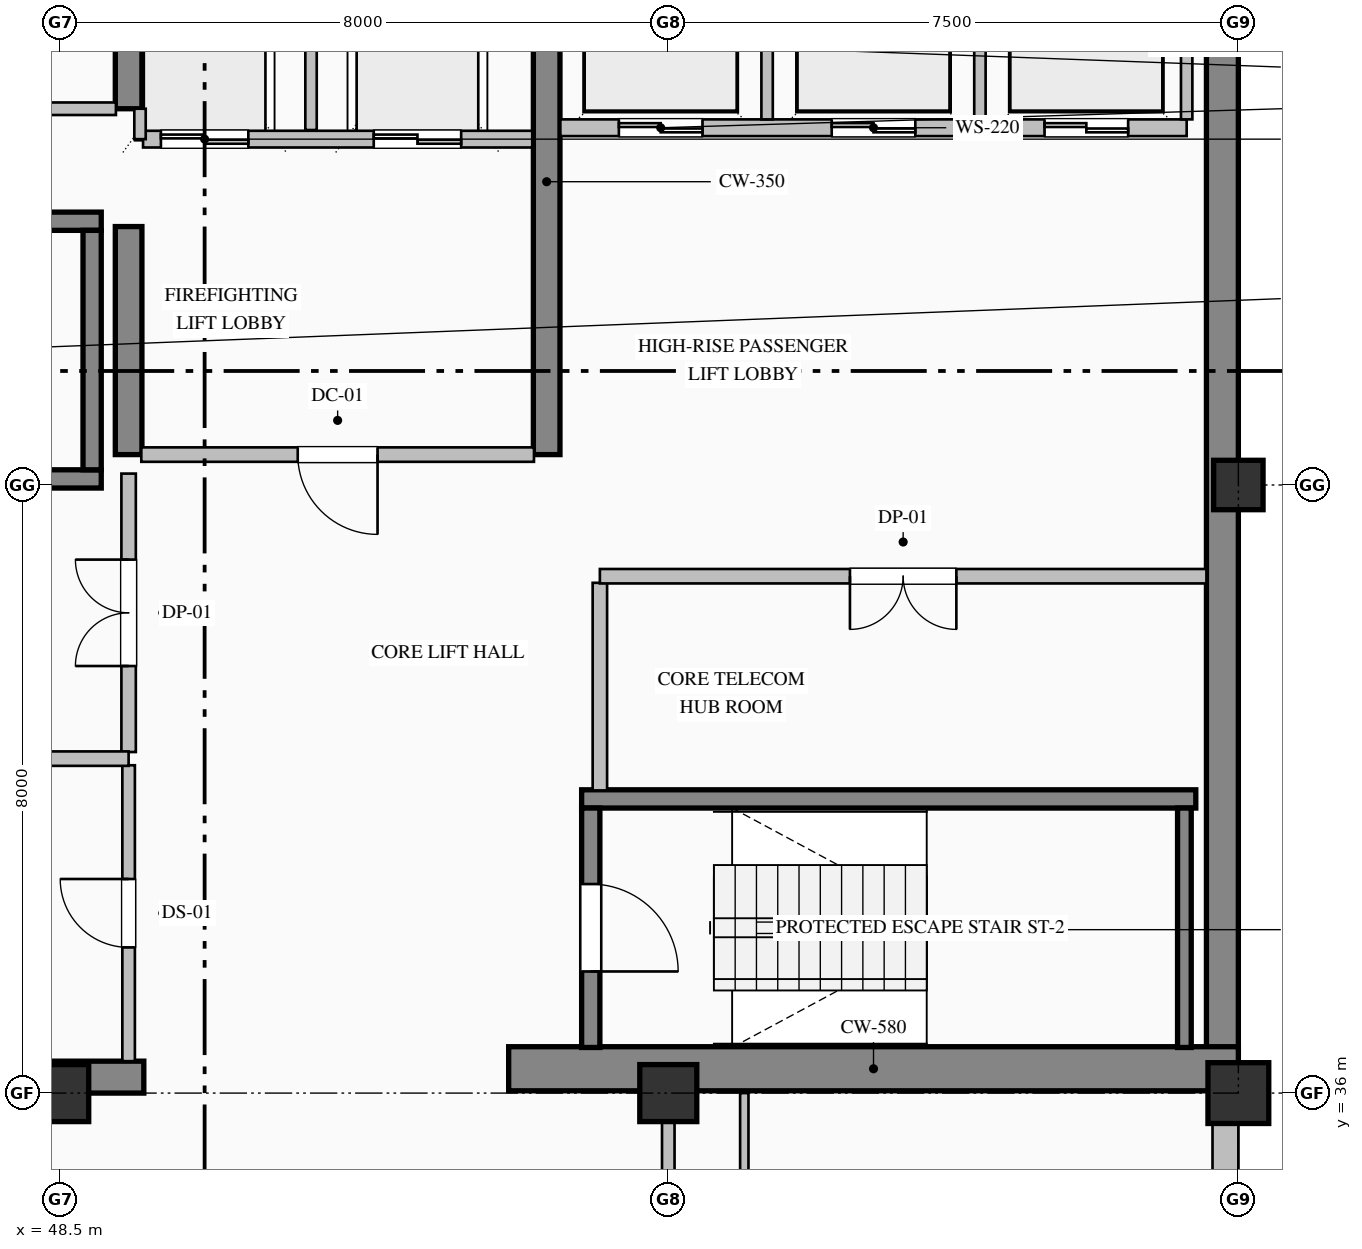
"""IFC4 building model, lengths in metres.
Left out: names, types, materials, properties, quantities, classifications, styles, units other than length and angle.
Written with IfcOpenShell. Run it as: python <this file> out.ifc"""

import sys

from ifc_helpers import new_model, si_unit, direction, frame, frame_2d, origin, origin_2d, place, context, subcontext, project, spatial, rectangle, hollow_rectangle, extrude, element, fill, save


model = new_model("IFC4")
c1 = context("Model", 3, precision=1e-05, world=origin(), true_north=direction((0.0, 1.0)))
c2 = subcontext(c1, "Body", "Model", "MODEL_VIEW")
j1 = project(units=[si_unit("LENGTHUNIT", "METRE"), si_unit("PLANEANGLEUNIT", "RADIAN")], contexts=[c1])
p1 = place(None, origin())
s1 = spatial("IfcSite", under=j1, at=p1, CompositionType="ELEMENT")
p2 = place(p1, origin())
s2 = spatial("IfcBuilding", under=s1, at=p2, CompositionType="ELEMENT")
p3 = place(p2, frame((0.0, 0.0, 335.2)))
s3 = spatial("IfcBuildingStorey", under=s2, at=p3, CompositionType="ELEMENT", Elevation=335.2)
p4 = place(p3, frame((63.79, 36.32, 0.0), z_axis=(0.0, 0.0, 1.0), x_axis=(0.0, 1.0, 0.0)))
e1 = element("IfcWall", 1, at=p4, inside=s3, PredefinedType="SHEAR", context=c2, shape_type="SweptSolid", body=[
    extrude(rectangle(XDim=15.26, YDim=0.42, at=frame_2d((7.63, 0.0))), origin(), (0.0, 0.0, 1.0), 3.785),
])
p5 = place(p3, frame((40.5, 36.21, 0.0), z_axis=(0.0, 0.0, 1.0), x_axis=(1.0, 0.0, 0.0)))
e2 = element("IfcWall", 2, at=p5, inside=s3, PredefinedType="SHEAR", context=c2, shape_type="SweptSolid", body=[
    extrude(rectangle(XDim=9.1, YDim=0.42, at=frame_2d((4.55, 0.0))), origin(), (0.0, 0.0, 1.0), 3.785),
])
p6 = place(p3, frame((54.4, 36.32, 0.0), z_axis=(0.0, 0.0, 1.0), x_axis=(1.0, 0.0, 0.0)))
e3 = element("IfcWall", 3, at=p6, inside=s3, PredefinedType="SHEAR", context=c2, shape_type="SweptSolid", body=[
    extrude(rectangle(XDim=9.6, YDim=0.58, at=frame_2d((4.8, 0.0))), origin(), (0.0, 0.0, 1.0), 4.0),
])
p7 = place(p3, frame((49.4, 44.4, 0.0), z_axis=(0.0, 0.0, 1.0), x_axis=(0.0, 1.0, 0.0)))
e4 = element("IfcWall", 4, at=p7, inside=s3, PredefinedType="SHEAR", context=c2, shape_type="SweptSolid", body=[
    extrude(rectangle(XDim=3.0, YDim=0.35, at=frame_2d((1.5, 0.0))), origin(), (0.0, 0.0, 1.0), 3.785),
])
p8 = place(p3, frame((49.4, 48.95, 0.0), z_axis=(0.0, 0.0, 1.0), x_axis=(0.0, 1.0, 0.0)))
e5 = element("IfcWall", 5, at=p8, inside=s3, PredefinedType="SHEAR", context=c2, shape_type="SweptSolid", body=[
    extrude(rectangle(XDim=2.63, YDim=0.35, at=frame_2d((1.315, 0.0))), origin(), (0.0, 0.0, 1.0), 3.785),
])
p9 = place(p3, frame((54.9, 44.4, 0.0), z_axis=(0.0, 0.0, 1.0), x_axis=(0.0, 1.0, 0.0)))
e6 = element("IfcWall", 6, at=p9, inside=s3, PredefinedType="SHEAR", context=c2, shape_type="SweptSolid", body=[
    extrude(rectangle(XDim=7.18, YDim=0.35, at=frame_2d((3.59, 0.0))), origin(), (0.0, 0.0, 1.0), 3.785),
])
for number, where, z_axis, x_axis in (
    (7, (48.5, 36.0, 0.0), (0.0, 0.0, 1.0), (1.0, 0.0, 0.0)),
    (8, (56.5, 36.0, 0.0), (0.0, 0.0, 1.0), (1.0, 0.0, 0.0)),
):
    element("IfcColumn", number, at=place(p3, frame(where, z_axis=z_axis, x_axis=x_axis)), inside=s3, PredefinedType="COLUMN", context=c2, shape_type="SweptSolid", body=[
        extrude(rectangle(XDim=0.75, YDim=0.75, at=origin_2d()), origin(), (0.0, 0.0, 1.0), 4.0),
    ])
p10 = place(p3, frame((64.0, 36.0, 0.0), z_axis=(0.0, 0.0, 1.0), x_axis=(1.0, 0.0, 0.0)))
e9 = element("IfcColumn", 9, at=p10, inside=s3, PredefinedType="COLUMN", context=c2, shape_type="SweptSolid", body=[
    extrude(hollow_rectangle(XDim=0.8, YDim=0.8, WallThickness=0.032, at=origin_2d()), origin(), (0.0, 0.0, 1.0), 4.0),
])
p11 = place(p3, frame((64.0, 44.0, 0.0), z_axis=(0.0, 0.0, 1.0), x_axis=(1.0, 0.0, 0.0)))
e10 = element("IfcColumn", 10, at=p11, inside=s3, PredefinedType="COLUMN", context=c2, shape_type="SweptSolid", body=[
    extrude(hollow_rectangle(XDim=0.65, YDim=0.65, WallThickness=0.028, at=origin_2d()), origin(), (0.0, 0.0, 1.0), 4.0),
])
p12 = place(p3, frame((63.83, 36.05, 0.0), z_axis=(0.0, 0.0, 1.0), x_axis=(0.0, -1.0, 0.0)))
e11 = element("IfcWall", 11, at=p12, inside=s3, PredefinedType="SOLIDWALL", context=c2, shape_type="SweptSolid", body=[
    extrude(rectangle(XDim=13.55, YDim=0.34, at=frame_2d((6.775, 0.0))), origin(), (0.0, 0.0, 1.0), 3.335),
])
p13 = place(p12, frame((3.125, 0.0, 0.9)))
e12 = element("IfcOpeningElement", 12, at=p13, cuts=e11, PredefinedType="OPENING", context=c2, shape_type="SweptSolid", body=[
    extrude(rectangle(XDim=0.95, YDim=1.85, at=frame_2d((0.475, 0.925))), frame((0.0, 0.18, 0.0), z_axis=(0.0, -1.0, 0.0), x_axis=(1.0, 0.0, 0.0)), (0.0, 0.0, 1.0), 0.36),
])
for number, where, z_axis, x_axis in (
    (13, (40.96, 47.47, 0.0), (0.0, 0.0, 1.0), (1.0, 0.0, 0.0)),
    (14, (49.04, 44.08, 0.0), (0.0, 0.0, 1.0), (-1.0, 0.0, 0.0)),
):
    element("IfcWall", number, at=place(p3, frame(where, z_axis=z_axis, x_axis=x_axis)), inside=s3, PredefinedType="SOLIDWALL", context=c2, shape_type="SweptSolid", body=[
        extrude(rectangle(XDim=8.08, YDim=0.24, at=frame_2d((4.04, 0.0))), origin(), (0.0, 0.0, 1.0), 4.0),
    ])
p14 = place(p3, frame((48.92, 44.2, 0.0), z_axis=(0.0, 0.0, 1.0), x_axis=(0.0, 1.0, 0.0)))
e15 = element("IfcWall", 15, at=p14, inside=s3, PredefinedType="SOLIDWALL", context=c2, shape_type="SweptSolid", body=[
    extrude(rectangle(XDim=3.15, YDim=0.24, at=frame_2d((1.575, 0.0))), origin(), (0.0, 0.0, 1.0), 4.0),
])
p15 = place(p3, frame((55.36, 39.87, 0.0), z_axis=(0.0, 0.0, 1.0), x_axis=(1.0, 0.0, 0.0)))
e16 = element("IfcWall", 16, at=p15, inside=s3, PredefinedType="SOLIDWALL", context=c2, shape_type="SweptSolid", body=[
    extrude(rectangle(XDim=8.08, YDim=0.24, at=frame_2d((4.04, 0.0))), origin(), (0.0, 0.0, 1.0), 4.0),
])
p16 = place(p3, frame((55.48, 39.75, 0.0), z_axis=(0.0, 0.0, 1.0), x_axis=(0.0, -1.0, 0.0)))
e17 = element("IfcWall", 17, at=p16, inside=s3, PredefinedType="SOLIDWALL", context=c2, shape_type="SweptSolid", body=[
    extrude(rectangle(XDim=3.15, YDim=0.24, at=frame_2d((1.575, 0.0))), origin(), (0.0, 0.0, 1.0), 4.0),
])
p17 = place(p16, frame((1.0, 0.0, 0.0)))
e18 = element("IfcOpeningElement", 18, at=p17, cuts=e17, PredefinedType="OPENING", context=c2, shape_type="SweptSolid", body=[
    extrude(rectangle(XDim=1.15, YDim=2.2, at=frame_2d((0.575, 1.1))), frame((0.0, 0.13, 0.0), z_axis=(0.0, -1.0, 0.0), x_axis=(1.0, 0.0, 0.0)), (0.0, 0.0, 1.0), 0.26),
])
p18 = place(p3, frame((63.29, 36.6, 0.0), z_axis=(0.0, 0.0, 1.0), x_axis=(0.0, 1.0, 0.0)))
e19 = element("IfcWall", 19, at=p18, inside=s3, PredefinedType="SOLIDWALL", context=c2, shape_type="SweptSolid", body=[
    extrude(rectangle(XDim=3.15, YDim=0.18, at=frame_2d((1.575, 0.0))), origin(), (0.0, 0.0, 1.0), 4.0),
])
p19 = place(p3, frame((54.71, 48.55, 0.0), z_axis=(0.0, 0.0, 1.0), x_axis=(-1.0, 0.0, 0.0)))
e20 = element("IfcWall", 20, at=p19, inside=s3, PredefinedType="PARTITIONING", context=c2, shape_type="SweptSolid", body=[
    extrude(rectangle(XDim=5.12, YDim=0.22, at=frame_2d((2.56, 0.0))), origin(), (0.0, 0.0, 1.0), 3.785),
])
p20 = place(p19, frame((3.735, 0.0, 0.0)))
e21 = element("IfcOpeningElement", 21, at=p20, cuts=e20, PredefinedType="OPENING", context=c2, shape_type="SweptSolid", body=[
    extrude(rectangle(XDim=1.15, YDim=2.2, at=frame_2d((0.575, 1.1))), frame((0.0, 0.12, 0.0), z_axis=(0.0, -1.0, 0.0), x_axis=(1.0, 0.0, 0.0)), (0.0, 0.0, 1.0), 0.24),
])
p21 = place(p19, frame((0.935, 0.0, 0.0)))
e22 = element("IfcOpeningElement", 22, at=p21, cuts=e20, PredefinedType="OPENING", context=c2, shape_type="SweptSolid", body=[
    extrude(rectangle(XDim=1.15, YDim=2.2, at=frame_2d((0.575, 1.1))), frame((0.0, 0.12, 0.0), z_axis=(0.0, -1.0, 0.0), x_axis=(1.0, 0.0, 0.0)), (0.0, 0.0, 1.0), 0.24),
])
p22 = place(p3, frame((51.8, 48.67, 0.0), z_axis=(0.0, 0.0, 1.0), x_axis=(0.0, 1.0, 0.0)))
e23 = element("IfcWall", 23, at=p22, inside=s3, PredefinedType="PARTITIONING", context=c2, shape_type="SweptSolid", body=[
    extrude(rectangle(XDim=2.91, YDim=0.15, at=frame_2d((1.455, 0.0))), origin(), (0.0, 0.0, 1.0), 3.785),
])
p23 = place(p3, frame((49.55, 48.55, 0.0), z_axis=(0.0, 0.0, 1.0), x_axis=(0.0, 1.0, 0.0)))
e24 = element("IfcWall", 24, at=p23, inside=s3, PredefinedType="PARTITIONING", context=c2, shape_type="SweptSolid", body=[
    extrude(rectangle(XDim=0.4, YDim=0.15, at=frame_2d((0.2, 0.0))), origin(), (0.0, 0.0, 1.0), 3.785),
])
p24 = place(p3, frame((63.32, 48.7, 0.0), z_axis=(0.0, 0.0, 1.0), x_axis=(-1.0, 0.0, 0.0)))
e25 = element("IfcWall", 25, at=p24, inside=s3, PredefinedType="PARTITIONING", context=c2, shape_type="SweptSolid", body=[
    extrude(rectangle(XDim=8.24, YDim=0.22, at=frame_2d((4.12, 0.0))), origin(), (0.0, 0.0, 1.0), 3.785),
])
p25 = place(p24, frame((6.37, 0.0, 0.0)))
e26 = element("IfcOpeningElement", 26, at=p25, cuts=e25, PredefinedType="OPENING", context=c2, shape_type="SweptSolid", body=[
    extrude(rectangle(XDim=1.1, YDim=2.2, at=frame_2d((0.55, 1.1))), frame((0.0, 0.12, 0.0), z_axis=(0.0, -1.0, 0.0), x_axis=(1.0, 0.0, 0.0)), (0.0, 0.0, 1.0), 0.24),
])
p26 = place(p24, frame((3.57, 0.0, 0.0)))
e27 = element("IfcOpeningElement", 27, at=p26, cuts=e25, PredefinedType="OPENING", context=c2, shape_type="SweptSolid", body=[
    extrude(rectangle(XDim=1.1, YDim=2.2, at=frame_2d((0.55, 1.1))), frame((0.0, 0.12, 0.0), z_axis=(0.0, -1.0, 0.0), x_axis=(1.0, 0.0, 0.0)), (0.0, 0.0, 1.0), 0.24),
])
p27 = place(p24, frame((0.77, 0.0, 0.0)))
e28 = element("IfcOpeningElement", 28, at=p27, cuts=e25, PredefinedType="OPENING", context=c2, shape_type="SweptSolid", body=[
    extrude(rectangle(XDim=1.1, YDim=2.2, at=frame_2d((0.55, 1.1))), frame((0.0, 0.12, 0.0), z_axis=(0.0, -1.0, 0.0), x_axis=(1.0, 0.0, 0.0)), (0.0, 0.0, 1.0), 0.24),
])
for number, where, z_axis, x_axis in (
    (29, (57.8, 48.81, 0.0), (0.0, 0.0, 1.0), (0.0, 1.0, 0.0)),
    (30, (60.6, 48.81, 0.0), (0.0, 0.0, 1.0), (0.0, 1.0, 0.0)),
    (31, (63.32, 48.81, 0.0), (0.0, 0.0, 1.0), (0.0, 1.0, 0.0)),
):
    element("IfcWall", number, at=place(p3, frame(where, z_axis=z_axis, x_axis=x_axis)), inside=s3, PredefinedType="PARTITIONING", context=c2, shape_type="SweptSolid", body=[
        extrude(rectangle(XDim=2.77, YDim=0.15, at=frame_2d((1.385, 0.0))), origin(), (0.0, 0.0, 1.0), 3.785),
    ])
p28 = place(p3, frame((46.6, 48.95, 0.0), z_axis=(0.0, 0.0, 1.0), x_axis=(1.0, 0.0, 0.0)))
e32 = element("IfcWall", 32, at=p28, inside=s3, PredefinedType="PARTITIONING", context=c2, shape_type="SweptSolid", body=[
    extrude(rectangle(XDim=2.633, YDim=0.165, at=frame_2d((1.316, 0.0))), origin(), (0.0, 0.0, 1.0), 3.785),
])
p29 = place(p28, frame((0.866, 0.0, 0.0)))
e33 = element("IfcOpeningElement", 33, at=p29, cuts=e32, PredefinedType="OPENING", context=c2, shape_type="SweptSolid", body=[
    extrude(rectangle(XDim=0.9, YDim=2.15, at=frame_2d((0.45, 1.075))), frame((0.0, 0.093, 0.0), z_axis=(0.0, -1.0, 0.0), x_axis=(1.0, 0.0, 0.0)), (0.0, 0.0, 1.0), 0.185),
])
p30 = place(p3, frame((54.733, 44.4, 0.0), z_axis=(0.0, 0.0, 1.0), x_axis=(-1.0, 0.0, 0.0)))
e34 = element("IfcWall", 34, at=p30, inside=s3, PredefinedType="PARTITIONING", context=c2, shape_type="SweptSolid", body=[
    extrude(rectangle(XDim=5.166, YDim=0.19, at=frame_2d((2.583, 0.0))), origin(), (0.0, 0.0, 1.0), 3.785),
])
p31 = place(p30, frame((2.058, 0.0, 0.0)))
e35 = element("IfcOpeningElement", 35, at=p31, cuts=e34, PredefinedType="OPENING", context=c2, shape_type="SweptSolid", body=[
    extrude(rectangle(XDim=1.05, YDim=2.15, at=frame_2d((0.525, 1.075))), frame((0.0, 0.105, 0.0), z_axis=(0.0, -1.0, 0.0), x_axis=(1.0, 0.0, 0.0)), (0.0, 0.0, 1.0), 0.21),
])
p32 = place(p3, frame((49.4, 36.42, 0.0), z_axis=(0.0, 0.0, 1.0), x_axis=(0.0, 1.0, 0.0)))
e36 = element("IfcWall", 36, at=p32, inside=s3, PredefinedType="PARTITIONING", context=c2, shape_type="SweptSolid", body=[
    extrude(rectangle(XDim=3.893, YDim=0.165, at=frame_2d((1.947, 0.0))), origin(), (0.0, 0.0, 1.0), 3.027),
])
p33 = place(p32, frame((1.497, 0.0, 0.0)))
e37 = element("IfcOpeningElement", 37, at=p33, cuts=e36, PredefinedType="OPENING", context=c2, shape_type="SweptSolid", body=[
    extrude(rectangle(XDim=0.9, YDim=2.15, at=frame_2d((0.45, 1.075))), frame((0.0, 0.093, 0.0), z_axis=(0.0, -1.0, 0.0), x_axis=(1.0, 0.0, 0.0)), (0.0, 0.0, 1.0), 0.185),
])
p34 = place(p3, frame((49.4, 40.487, 0.0), z_axis=(0.0, 0.0, 1.0), x_axis=(0.0, 1.0, 0.0)))
e38 = element("IfcWall", 38, at=p34, inside=s3, PredefinedType="PARTITIONING", context=c2, shape_type="SweptSolid", body=[
    extrude(rectangle(XDim=3.663, YDim=0.19, at=frame_2d((1.832, 0.0))), origin(), (0.0, 0.0, 1.0), 3.027),
])
p35 = place(p34, frame((1.132, 0.0, 0.0)))
e39 = element("IfcOpeningElement", 39, at=p35, cuts=e38, PredefinedType="OPENING", context=c2, shape_type="SweptSolid", body=[
    extrude(rectangle(XDim=1.4, YDim=2.25, at=frame_2d((0.7, 1.125))), frame((0.0, 0.105, 0.0), z_axis=(0.0, -1.0, 0.0), x_axis=(1.0, 0.0, 0.0)), (0.0, 0.0, 1.0), 0.21),
])
p36 = place(p3, frame((55.6, 42.713, 0.0), z_axis=(0.0, 0.0, 1.0), x_axis=(0.0, -1.0, 0.0)))
e40 = element("IfcWall", 40, at=p36, inside=s3, PredefinedType="PARTITIONING", context=c2, shape_type="SweptSolid", body=[
    extrude(rectangle(XDim=2.731, YDim=0.19, at=frame_2d((1.365, 0.0))), origin(), (0.0, 0.0, 1.0), 3.785),
])
p37 = place(p3, frame((40.92, 40.4, 0.0), z_axis=(0.0, 0.0, 1.0), x_axis=(1.0, 0.0, 0.0)))
e41 = element("IfcWall", 41, at=p37, inside=s3, PredefinedType="PARTITIONING", context=c2, shape_type="SweptSolid", body=[
    extrude(rectangle(XDim=8.48, YDim=0.19, at=frame_2d((4.24, 0.0))), origin(), (0.0, 0.0, 1.0), 3.785),
])
p38 = place(p3, frame((63.58, 42.8, 0.0), z_axis=(0.0, 0.0, 1.0), x_axis=(-1.0, 0.0, 0.0)))
e42 = element("IfcWall", 42, at=p38, inside=s3, PredefinedType="PARTITIONING", context=c2, shape_type="SweptSolid", body=[
    extrude(rectangle(XDim=7.98, YDim=0.19, at=frame_2d((3.99, 0.0))), origin(), (0.0, 0.0, 1.0), 3.785),
])
p39 = place(p38, frame((3.29, 0.0, 0.0)))
e43 = element("IfcOpeningElement", 43, at=p39, cuts=e42, PredefinedType="OPENING", context=c2, shape_type="SweptSolid", body=[
    extrude(rectangle(XDim=1.4, YDim=2.25, at=frame_2d((0.7, 1.125))), frame((0.0, 0.105, 0.0), z_axis=(0.0, -1.0, 0.0), x_axis=(1.0, 0.0, 0.0)), (0.0, 0.0, 1.0), 0.21),
])
p40 = place(p3, frame((56.5, 36.0, 0.0), z_axis=(0.0, 0.0, 1.0), x_axis=(0.0, -1.0, 0.0)))
e44 = element("IfcWall", 44, at=p40, inside=s3, PredefinedType="PARTITIONING", context=c2, shape_type="SweptSolid", body=[
    extrude(rectangle(XDim=2.325, YDim=0.165, at=frame_2d((1.163, 0.0))), origin(), (0.0, 0.0, 1.0), 3.177),
])
p41 = place(p3, frame((57.5, 36.0, 0.0), z_axis=(0.0, 0.0, 1.0), x_axis=(0.0, -1.0, 0.0)))
e45 = element("IfcWall", 45, at=p41, inside=s3, PredefinedType="MOVABLE", context=c2, shape_type="SweptSolid", body=[
    extrude(rectangle(XDim=10.926, YDim=0.11, at=frame_2d((5.463, 0.0))), origin(), (0.0, 0.0, 1.0), 3.785),
])
p42 = place(p17, origin())
e46 = element("IfcDoor", 46, at=p42, inside=s3, OperationType="SINGLE_SWING_RIGHT", PredefinedType="DOOR", context=c2, shape_type="SweptSolid", body=[
    extrude(rectangle(XDim=1.15, YDim=2.2, at=frame_2d((0.575, 1.1))), frame((0.0, 0.025, 0.0), z_axis=(0.0, -1.0, 0.0), x_axis=(1.0, 0.0, 0.0)), (0.0, 0.0, 1.0), 0.05),
])
fill(e18, e46)
p43 = place(p20, origin())
e47 = element("IfcDoor", 47, at=p43, inside=s3, OperationType="DOUBLE_DOOR_SLIDING", PredefinedType="DOOR", context=c2, shape_type="SweptSolid", body=[
    extrude(rectangle(XDim=1.15, YDim=2.2, at=frame_2d((0.575, 1.1))), frame((0.0, 0.025, 0.0), z_axis=(0.0, -1.0, 0.0), x_axis=(1.0, 0.0, 0.0)), (0.0, 0.0, 1.0), 0.05),
])
fill(e21, e47)
p44 = place(p21, origin())
e48 = element("IfcDoor", 48, at=p44, inside=s3, OperationType="DOUBLE_DOOR_SLIDING", PredefinedType="DOOR", context=c2, shape_type="SweptSolid", body=[
    extrude(rectangle(XDim=1.15, YDim=2.2, at=frame_2d((0.575, 1.1))), frame((0.0, 0.025, 0.0), z_axis=(0.0, -1.0, 0.0), x_axis=(1.0, 0.0, 0.0)), (0.0, 0.0, 1.0), 0.05),
])
fill(e22, e48)
p45 = place(p25, origin())
e49 = element("IfcDoor", 49, at=p45, inside=s3, OperationType="DOUBLE_DOOR_SLIDING", PredefinedType="DOOR", context=c2, shape_type="SweptSolid", body=[
    extrude(rectangle(XDim=1.1, YDim=2.2, at=frame_2d((0.55, 1.1))), frame((0.0, 0.025, 0.0), z_axis=(0.0, -1.0, 0.0), x_axis=(1.0, 0.0, 0.0)), (0.0, 0.0, 1.0), 0.05),
])
fill(e26, e49)
p46 = place(p26, origin())
e50 = element("IfcDoor", 50, at=p46, inside=s3, OperationType="DOUBLE_DOOR_SLIDING", PredefinedType="DOOR", context=c2, shape_type="SweptSolid", body=[
    extrude(rectangle(XDim=1.1, YDim=2.2, at=frame_2d((0.55, 1.1))), frame((0.0, 0.025, 0.0), z_axis=(0.0, -1.0, 0.0), x_axis=(1.0, 0.0, 0.0)), (0.0, 0.0, 1.0), 0.05),
])
fill(e27, e50)
p47 = place(p27, origin())
e51 = element("IfcDoor", 51, at=p47, inside=s3, OperationType="DOUBLE_DOOR_SLIDING", PredefinedType="DOOR", context=c2, shape_type="SweptSolid", body=[
    extrude(rectangle(XDim=1.1, YDim=2.2, at=frame_2d((0.55, 1.1))), frame((0.0, 0.025, 0.0), z_axis=(0.0, -1.0, 0.0), x_axis=(1.0, 0.0, 0.0)), (0.0, 0.0, 1.0), 0.05),
])
fill(e28, e51)
p48 = place(p31, origin())
e52 = element("IfcDoor", 52, at=p48, inside=s3, OperationType="SINGLE_SWING_LEFT", PredefinedType="DOOR", context=c2, shape_type="SweptSolid", body=[
    extrude(rectangle(XDim=1.05, YDim=2.15, at=frame_2d((0.525, 1.075))), frame((0.0, 0.025, 0.0), z_axis=(0.0, -1.0, 0.0), x_axis=(1.0, 0.0, 0.0)), (0.0, 0.0, 1.0), 0.05),
])
fill(e35, e52)
p49 = place(p33, origin())
e53 = element("IfcDoor", 53, at=p49, inside=s3, OperationType="SINGLE_SWING_RIGHT", PredefinedType="DOOR", context=c2, shape_type="SweptSolid", body=[
    extrude(rectangle(XDim=0.9, YDim=2.15, at=frame_2d((0.45, 1.075))), frame((0.0, 0.025, 0.0), z_axis=(0.0, -1.0, 0.0), x_axis=(1.0, 0.0, 0.0)), (0.0, 0.0, 1.0), 0.05),
])
fill(e37, e53)
p50 = place(p35, origin())
e54 = element("IfcDoor", 54, at=p50, inside=s3, OperationType="DOUBLE_DOOR_SINGLE_SWING", PredefinedType="DOOR", context=c2, shape_type="SweptSolid", body=[
    extrude(rectangle(XDim=1.4, YDim=2.25, at=frame_2d((0.7, 1.125))), frame((0.0, 0.025, 0.0), z_axis=(0.0, -1.0, 0.0), x_axis=(1.0, 0.0, 0.0)), (0.0, 0.0, 1.0), 0.05),
])
fill(e39, e54)
p51 = place(p39, origin())
e55 = element("IfcDoor", 55, at=p51, inside=s3, OperationType="DOUBLE_DOOR_SINGLE_SWING", PredefinedType="DOOR", context=c2, shape_type="SweptSolid", body=[
    extrude(rectangle(XDim=1.4, YDim=2.25, at=frame_2d((0.7, 1.125))), frame((0.0, 0.025, 0.0), z_axis=(0.0, -1.0, 0.0), x_axis=(1.0, 0.0, 0.0)), (0.0, 0.0, 1.0), 0.05),
])
fill(e43, e55)
save(model, sys.argv[1])
